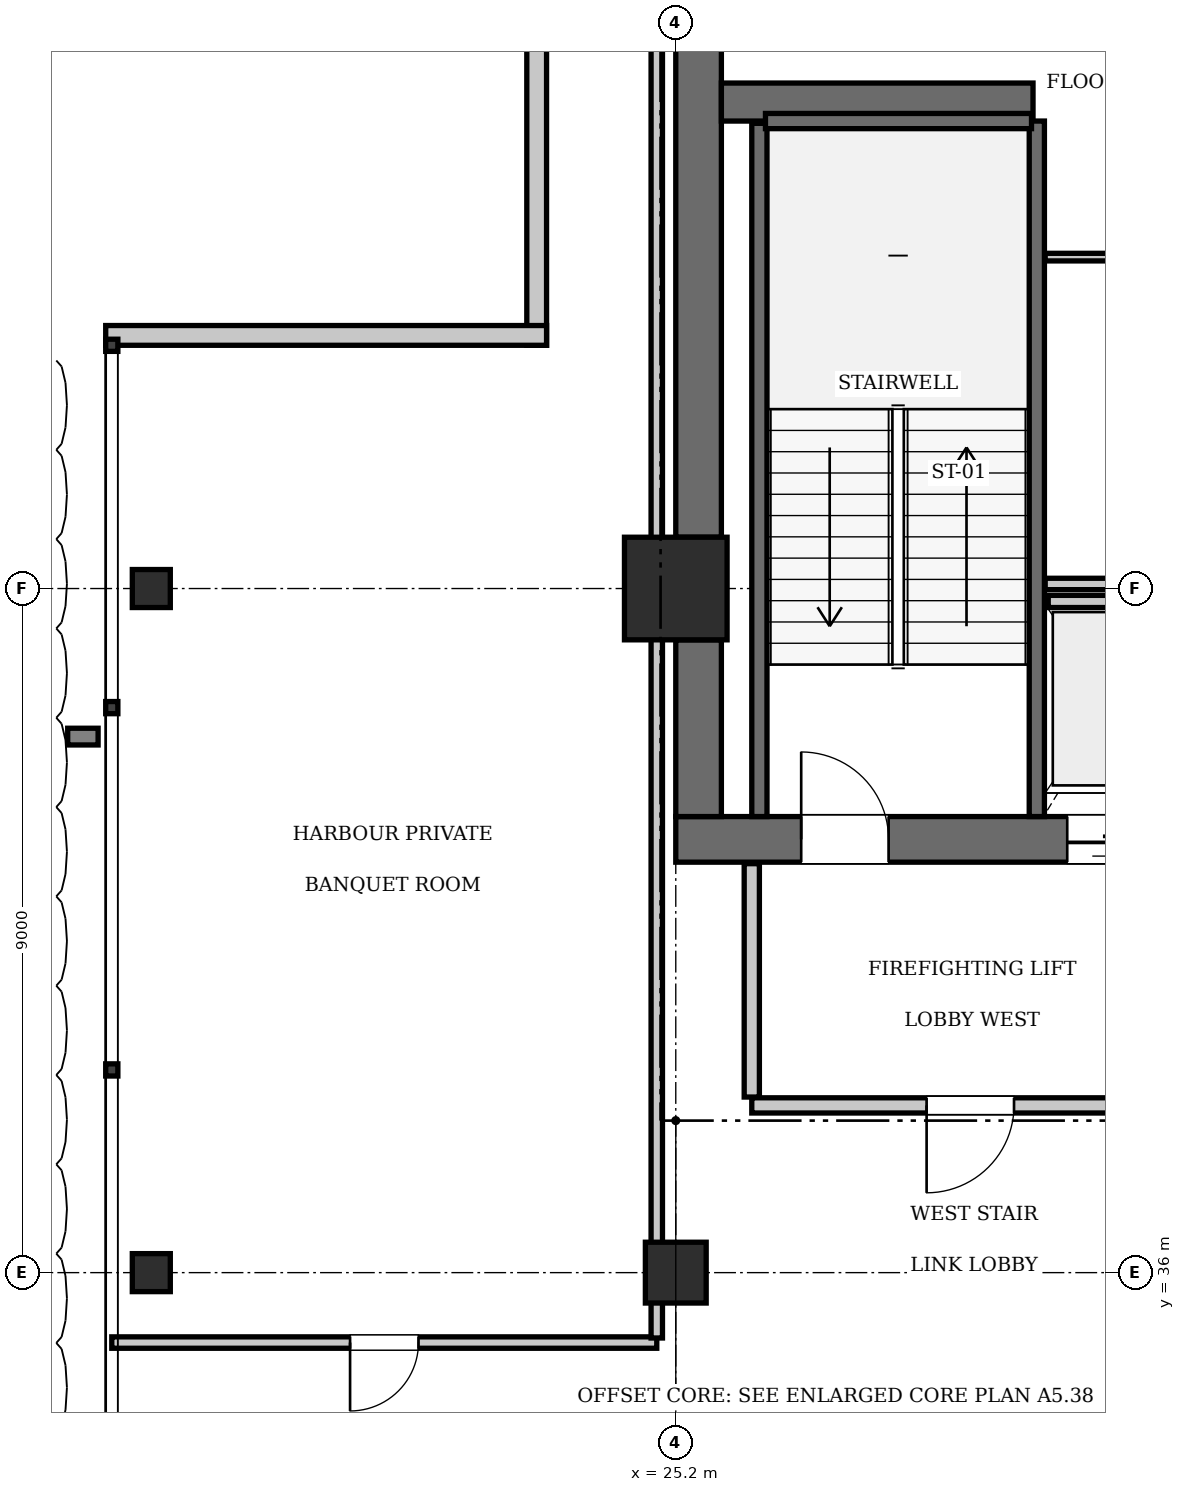
"""IFC4 building model, lengths in metres.
Left out: names, types, materials, properties, quantities, classifications, styles, units other than length and angle.
Written with IfcOpenShell. Run it as: python <this file> out.ifc"""

import sys

from ifc_helpers import new_model, si_unit, direction, frame, frame_2d, origin, origin_2d, place, context, subcontext, project, spatial, rectangle, i_section, extrude, element, fill, save


model = new_model("IFC4")
c1 = context("Model", 3, precision=1e-05, world=origin(), true_north=direction((0.0, 1.0)))
c2 = subcontext(c1, "Body", "Model", "MODEL_VIEW")
j1 = project(units=[si_unit("LENGTHUNIT", "METRE"), si_unit("PLANEANGLEUNIT", "RADIAN")], contexts=[c1])
p1 = place(None, origin())
s1 = spatial("IfcSite", under=j1, at=p1, CompositionType="ELEMENT")
p2 = place(p1, origin())
s2 = spatial("IfcBuilding", under=s1, at=p2, CompositionType="ELEMENT")
p3 = place(p2, frame((0.0, 0.0, 345.1)))
s3 = spatial("IfcBuildingStorey", under=s2, at=p3, CompositionType="ELEMENT", Elevation=345.1)
p4 = place(p3, frame((25.2, 45.0, 0.0), z_axis=(0.0, 0.0, 1.0), x_axis=(1.0, 0.0, 0.0)))
e1 = element("IfcColumn", 1, at=p4, inside=s3, PredefinedType="COLUMN", context=c2, shape_type="SweptSolid", body=[
    extrude(rectangle(XDim=1.35, YDim=1.35, at=origin_2d()), origin(), (0.0, 0.0, 1.0), 4.55),
])
p5 = place(p3, frame((25.2, 41.7, 0.0), z_axis=(0.0, 0.0, 1.0), x_axis=(1.0, 0.0, 0.0)))
e2 = element("IfcWall", 2, at=p5, inside=s3, PredefinedType="SHEAR", context=c2, shape_type="SweptSolid", body=[
    extrude(rectangle(XDim=6.8, YDim=0.6, at=frame_2d((3.4, 0.0))), origin(), (0.0, 0.0, 1.0), 4.55),
])
p6 = place(p5, frame((1.65, 0.0, 0.0)))
e3 = element("IfcOpeningElement", 3, at=p6, cuts=e2, PredefinedType="OPENING", context=c2, shape_type="SweptSolid", body=[
    extrude(rectangle(XDim=1.15, YDim=2.15, at=frame_2d((0.575, 1.075))), frame((0.0, 0.31, 0.0), z_axis=(0.0, -1.0, 0.0), x_axis=(1.0, 0.0, 0.0)), (0.0, 0.0, 1.0), 0.62),
])
p7 = place(p5, frame((5.15, 0.0, 0.0)))
e4 = element("IfcOpeningElement", 4, at=p7, cuts=e2, PredefinedType="OPENING", context=c2, shape_type="SweptSolid", body=[
    extrude(rectangle(XDim=1.1, YDim=2.2, at=frame_2d((0.55, 1.1))), frame((0.0, 0.31, 0.0), z_axis=(0.0, -1.0, 0.0), x_axis=(1.0, 0.0, 0.0)), (0.0, 0.0, 1.0), 0.62),
])
p8 = place(p3, frame((25.5, 42.0, 0.0), z_axis=(0.0, 0.0, 1.0), x_axis=(0.0, 1.0, 0.0)))
e5 = element("IfcWall", 5, at=p8, inside=s3, PredefinedType="SHEAR", context=c2, shape_type="SweptSolid", body=[
    extrude(rectangle(XDim=2.325, YDim=0.6, at=frame_2d((1.163, 0.0))), origin(), (0.0, 0.0, 1.0), 4.55),
])
p9 = place(p3, frame((25.5, 45.675, 0.0), z_axis=(0.0, 0.0, 1.0), x_axis=(0.0, 1.0, 0.0)))
e6 = element("IfcWall", 6, at=p9, inside=s3, PredefinedType="SHEAR", context=c2, shape_type="SweptSolid", body=[
    extrude(rectangle(XDim=7.725, YDim=0.6, at=frame_2d((3.862, 0.0))), origin(), (0.0, 0.0, 1.0), 4.55),
])
p10 = place(p3, frame((25.8, 51.4, 0.0), z_axis=(0.0, 0.0, 1.0), x_axis=(1.0, 0.0, 0.0)))
e7 = element("IfcWall", 7, at=p10, inside=s3, PredefinedType="SHEAR", context=c2, shape_type="SweptSolid", body=[
    extrude(rectangle(XDim=4.1, YDim=0.5, at=frame_2d((2.05, 0.0))), origin(), (0.0, 0.0, 1.0), 4.55),
])
p11 = place(p3, frame((25.2, 36.0, 0.0), z_axis=(0.0, 0.0, 1.0), x_axis=(1.0, 0.0, 0.0)))
e8 = element("IfcColumn", 8, at=p11, inside=s3, PredefinedType="COLUMN", context=c2, shape_type="SweptSolid", body=[
    extrude(rectangle(XDim=0.8, YDim=0.8, at=origin_2d()), origin(), (0.0, 0.0, 1.0), 4.55),
])
for number, where, z_axis, x_axis in (
    (9, (18.3, 36.0, 0.0), (0.0, 0.0, 1.0), (1.0, 0.0, 0.0)),
    (10, (18.3, 45.0, 0.0), (0.0, 0.0, 1.0), (1.0, 0.0, 0.0)),
):
    element("IfcColumn", number, at=place(p3, frame(where, z_axis=z_axis, x_axis=x_axis)), inside=s3, PredefinedType="COLUMN", context=c2, shape_type="SweptSolid", body=[
        extrude(i_section(OverallWidth=0.5, OverallDepth=0.5, WebThickness=0.022, FlangeThickness=0.032, at=origin_2d()), origin(), (0.0, 0.0, 1.0), 4.55),
    ])
p12 = place(p3, frame((29.95, 42.0, 0.0), z_axis=(0.0, 0.0, 1.0), x_axis=(0.0, 1.0, 0.0)))
e11 = element("IfcWall", 11, at=p12, inside=s3, PredefinedType="SOLIDWALL", context=c2, shape_type="SweptSolid", body=[
    extrude(rectangle(XDim=9.15, YDim=0.2, at=frame_2d((4.575, 0.0))), origin(), (0.0, 0.0, 1.0), 4.31),
])
p13 = place(p3, frame((26.3, 42.0, 0.0), z_axis=(0.0, 0.0, 1.0), x_axis=(0.0, 1.0, 0.0)))
e12 = element("IfcWall", 12, at=p13, inside=s3, PredefinedType="SOLIDWALL", context=c2, shape_type="SweptSolid", body=[
    extrude(rectangle(XDim=9.12, YDim=0.2, at=frame_2d((4.56, 0.0))), origin(), (0.0, 0.0, 1.0), 4.31),
])
p14 = place(p3, frame((26.38, 51.15, 0.0), z_axis=(0.0, 0.0, 1.0), x_axis=(1.0, 0.0, 0.0)))
e13 = element("IfcWall", 13, at=p14, inside=s3, PredefinedType="SOLIDWALL", context=c2, shape_type="SweptSolid", body=[
    extrude(rectangle(XDim=3.5, YDim=0.2, at=frame_2d((1.75, 0.0))), origin(), (0.0, 0.0, 1.0), 4.31),
])
p15 = place(p3, frame((30.1, 44.83, 0.0), z_axis=(0.0, 0.0, 1.0), x_axis=(1.0, 0.0, 0.0)))
e14 = element("IfcWall", 14, at=p15, inside=s3, PredefinedType="SOLIDWALL", context=c2, shape_type="SweptSolid", body=[
    extrude(rectangle(XDim=1.6, YDim=0.16, at=frame_2d((0.8, 0.0))), origin(), (0.0, 0.0, 1.0), 4.31),
])
for number, where, z_axis, x_axis in (
    (15, (23.37, 48.2, 0.0), (0.0, 0.0, 1.0), (0.0, 1.0, 0.0)),
    (16, (17.7, 48.33, 0.0), (0.0, 0.0, 1.0), (1.0, 0.0, 0.0)),
):
    element("IfcWall", number, at=place(p3, frame(where, z_axis=z_axis, x_axis=x_axis)), inside=s3, PredefinedType="SOLIDWALL", context=c2, shape_type="SweptSolid", body=[
        extrude(rectangle(XDim=5.8, YDim=0.26, at=frame_2d((2.9, 0.0))), origin(), (0.0, 0.0, 1.0), 4.31),
    ])
p16 = place(p3, frame((26.2, 38.2, 0.0), z_axis=(0.0, 0.0, 1.0), x_axis=(1.0, 0.0, 0.0)))
e17 = element("IfcWall", 17, at=p16, inside=s3, PredefinedType="PARTITIONING", context=c2, shape_type="SweptSolid", body=[
    extrude(rectangle(XDim=5.8, YDim=0.2, at=frame_2d((2.9, 0.0))), origin(), (0.0, 0.0, 1.0), 4.31),
])
p17 = place(p16, frame((2.3, 0.0, 0.0)))
e18 = element("IfcOpeningElement", 18, at=p17, cuts=e17, PredefinedType="OPENING", context=c2, shape_type="SweptSolid", body=[
    extrude(rectangle(XDim=1.15, YDim=2.15, at=frame_2d((0.575, 1.075))), frame((0.0, 0.11, 0.0), z_axis=(0.0, -1.0, 0.0), x_axis=(1.0, 0.0, 0.0)), (0.0, 0.0, 1.0), 0.22),
])
p18 = place(p3, frame((26.2, 38.31, 0.0), z_axis=(0.0, 0.0, 1.0), x_axis=(0.0, 1.0, 0.0)))
e19 = element("IfcWall", 19, at=p18, inside=s3, PredefinedType="PARTITIONING", context=c2, shape_type="SweptSolid", body=[
    extrude(rectangle(XDim=3.07, YDim=0.2, at=frame_2d((1.535, 0.0))), origin(), (0.0, 0.0, 1.0), 4.31),
])
p19 = place(p3, frame((30.06, 45.06, 0.0), z_axis=(0.0, 0.0, 1.0), x_axis=(1.0, 0.0, 0.0)))
e20 = element("IfcWall", 20, at=p19, inside=s3, PredefinedType="PARTITIONING", context=c2, shape_type="SweptSolid", body=[
    extrude(rectangle(XDim=3.18, YDim=0.15, at=frame_2d((1.59, 0.0))), origin(), (0.0, 0.0, 1.0), 4.31),
])
p20 = place(p3, frame((30.06, 49.36, 0.0), z_axis=(0.0, 0.0, 1.0), x_axis=(1.0, 0.0, 0.0)))
e21 = element("IfcWall", 21, at=p20, inside=s3, PredefinedType="PARTITIONING", context=c2, shape_type="SweptSolid", body=[
    extrude(rectangle(XDim=3.18, YDim=0.1, at=frame_2d((1.59, 0.0))), origin(), (0.0, 0.0, 1.0), 4.31),
])
p21 = place(p20, frame((1.95, 0.0, 0.0)))
e22 = element("IfcOpeningElement", 22, at=p21, cuts=e21, PredefinedType="OPENING", context=c2, shape_type="SweptSolid", body=[
    extrude(rectangle(XDim=0.8, YDim=2.05, at=frame_2d((0.4, 1.025))), frame((0.0, 0.06, 0.0), z_axis=(0.0, -1.0, 0.0), x_axis=(1.0, 0.0, 0.0)), (0.0, 0.0, 1.0), 0.12),
])
p22 = place(p3, frame((17.78, 35.08, 0.0), z_axis=(0.0, 0.0, 1.0), x_axis=(1.0, 0.0, 0.0)))
e23 = element("IfcWall", 23, at=p22, inside=s3, PredefinedType="PARTITIONING", context=c2, shape_type="SweptSolid", body=[
    extrude(rectangle(XDim=7.17, YDim=0.15, at=frame_2d((3.585, 0.0))), origin(), (0.0, 0.0, 1.0), 4.31),
])
p23 = place(p22, frame((3.135, 0.0, 0.0)))
e24 = element("IfcOpeningElement", 24, at=p23, cuts=e23, PredefinedType="OPENING", context=c2, shape_type="SweptSolid", body=[
    extrude(rectangle(XDim=0.9, YDim=2.1, at=frame_2d((0.45, 1.05))), frame((0.0, 0.085, 0.0), z_axis=(0.0, -1.0, 0.0), x_axis=(1.0, 0.0, 0.0)), (0.0, 0.0, 1.0), 0.17),
])
p24 = place(p3, frame((24.95, 35.14, 0.0), z_axis=(0.0, 0.0, 1.0), x_axis=(0.0, 1.0, 0.0)))
e25 = element("IfcWall", 25, at=p24, inside=s3, PredefinedType="PARTITIONING", context=c2, shape_type="SweptSolid", body=[
    extrude(rectangle(XDim=18.78, YDim=0.15, at=frame_2d((9.39, 0.0))), origin(), (0.0, 0.0, 1.0), 4.31),
])
p25 = place(p6, origin())
e26 = element("IfcDoor", 26, at=p25, inside=s3, OperationType="SINGLE_SWING_LEFT", PredefinedType="DOOR", context=c2, shape_type="SweptSolid", body=[
    extrude(rectangle(XDim=1.15, YDim=2.15, at=frame_2d((0.575, 1.075))), frame((0.0, 0.025, 0.0), z_axis=(0.0, -1.0, 0.0), x_axis=(1.0, 0.0, 0.0)), (0.0, 0.0, 1.0), 0.05),
])
fill(e3, e26)
p26 = place(p7, frame((1.1, 0.0, 0.0), z_axis=(0.0, 0.0, 1.0), x_axis=(-1.0, 0.0, 0.0)))
e27 = element("IfcDoor", 27, at=p26, inside=s3, OperationType="SLIDING_TO_LEFT", PredefinedType="DOOR", context=c2, shape_type="SweptSolid", body=[
    extrude(rectangle(XDim=1.1, YDim=2.2, at=frame_2d((0.55, 1.1))), frame((0.0, 0.025, 0.0), z_axis=(0.0, -1.0, 0.0), x_axis=(1.0, 0.0, 0.0)), (0.0, 0.0, 1.0), 0.05),
])
fill(e4, e27)
p27 = place(p17, frame((1.15, 0.0, 0.0), z_axis=(0.0, 0.0, 1.0), x_axis=(-1.0, 0.0, 0.0)))
e28 = element("IfcDoor", 28, at=p27, inside=s3, OperationType="SINGLE_SWING_RIGHT", PredefinedType="DOOR", context=c2, shape_type="SweptSolid", body=[
    extrude(rectangle(XDim=1.15, YDim=2.15, at=frame_2d((0.575, 1.075))), frame((0.0, 0.025, 0.0), z_axis=(0.0, -1.0, 0.0), x_axis=(1.0, 0.0, 0.0)), (0.0, 0.0, 1.0), 0.05),
])
fill(e18, e28)
p28 = place(p23, frame((0.9, 0.0, 0.0), z_axis=(0.0, 0.0, 1.0), x_axis=(-1.0, 0.0, 0.0)))
e29 = element("IfcDoor", 29, at=p28, inside=s3, OperationType="SINGLE_SWING_RIGHT", PredefinedType="DOOR", context=c2, shape_type="SweptSolid", body=[
    extrude(rectangle(XDim=0.9, YDim=2.1, at=frame_2d((0.45, 1.05))), frame((0.0, 0.025, 0.0), z_axis=(0.0, -1.0, 0.0), x_axis=(1.0, 0.0, 0.0)), (0.0, 0.0, 1.0), 0.05),
])
fill(e24, e29)
save(model, sys.argv[1])
